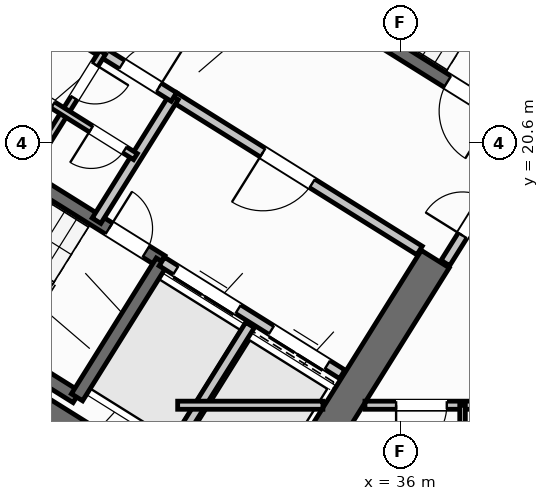
"""IFC4 building model, lengths in metres.
Left out: names, types, materials, properties, quantities, classifications, styles, units other than length and angle.
Written with IfcOpenShell. Run it as: python <this file> out.ifc"""

import sys

from ifc_helpers import new_model, si_unit, direction, frame, frame_2d, origin, place, context, subcontext, project, spatial, rectangle, extrude, source, transform, mapped, element, fill, save


model = new_model("IFC4")
c1 = context("Model", 3, precision=1e-05, world=origin(), true_north=direction((0.0, 1.0)))
c2 = subcontext(c1, "Body", "Model", "MODEL_VIEW")
j1 = project(units=[si_unit("LENGTHUNIT", "METRE"), si_unit("PLANEANGLEUNIT", "RADIAN")], contexts=[c1])
p1 = place(None, origin())
s1 = spatial("IfcSite", under=j1, at=p1, CompositionType="ELEMENT")
p2 = place(p1, origin())
s2 = spatial("IfcBuilding", under=s1, at=p2, CompositionType="ELEMENT")
p3 = place(p2, frame((0.0, 0.0, 49.2)))
s3 = spatial("IfcBuildingStorey", under=s2, at=p3, CompositionType="ELEMENT", Elevation=49.2)
p4 = place(p3, frame((33.409, 12.45, 0.0), z_axis=(0.0, 0.0, 1.0), x_axis=(-0.848051132073, 0.529914405721, 0.0)))
e1 = element("IfcWall", 1, at=p4, inside=s3, PredefinedType="SHEAR", context=c2, shape_type="SweptSolid", body=[
    extrude(rectangle(XDim=13.24, YDim=0.65, at=frame_2d((6.62, 0.0))), origin(), (0.0, 0.0, 1.0), 3.35),
])
p5 = place(p3, frame((36.683, 18.304, 0.0), z_axis=(0.0, 0.0, 1.0), x_axis=(-0.529899109053, -0.848060690178, 0.0)))
e2 = element("IfcWall", 2, at=p5, inside=s3, PredefinedType="SHEAR", context=c2, shape_type="SweptSolid", body=[
    extrude(rectangle(XDim=6.375, YDim=0.65, at=frame_2d((3.188, 0.0))), origin(), (0.0, 0.0, 1.0), 3.35),
])
p6 = place(p3, frame((29.268, 6.429, 0.0), z_axis=(0.0, 0.0, 1.0), x_axis=(-0.848049971435, 0.529916263149, 0.0)))
e3 = element("IfcWall", 3, at=p6, inside=s3, PredefinedType="STANDARD", context=c2, shape_type="SweptSolid", body=[
    extrude(rectangle(XDim=31.588, YDim=0.32, at=frame_2d((15.794, 0.0))), origin(), (0.0, 0.0, 1.0), 3.35),
])
p7 = place(p6, frame((16.362, 0.0, 0.0)))
e4 = element("IfcOpeningElement", 4, at=p7, cuts=e3, PredefinedType="OPENING", context=c2, shape_type="SweptSolid", body=[
    extrude(rectangle(XDim=1.2, YDim=2.15, at=frame_2d((0.6, 1.075))), frame((0.0, 0.17, 0.0), z_axis=(0.0, -1.0, 0.0), x_axis=(1.0, 0.0, 0.0)), (0.0, 0.0, 1.0), 0.34),
])
p8 = place(p6, frame((2.989, 0.0, 0.8)))
e5 = element("IfcOpeningElement", 5, at=p8, cuts=e3, PredefinedType="OPENING", context=c2, shape_type="SweptSolid", body=[
    extrude(rectangle(XDim=2.1, YDim=1.55, at=frame_2d((1.05, 0.775))), frame((0.0, 0.17, 0.0), z_axis=(0.0, -1.0, 0.0), x_axis=(1.0, 0.0, 0.0)), (0.0, 0.0, 1.0), 0.34),
])
p9 = place(p6, frame((8.359, 0.0, 0.8)))
e6 = element("IfcOpeningElement", 6, at=p9, cuts=e3, PredefinedType="OPENING", context=c2, shape_type="SweptSolid", body=[
    extrude(rectangle(XDim=2.1, YDim=1.55, at=frame_2d((1.05, 0.775))), frame((0.0, 0.17, 0.0), z_axis=(0.0, -1.0, 0.0), x_axis=(1.0, 0.0, 0.0)), (0.0, 0.0, 1.0), 0.34),
])
p10 = place(p6, frame((13.284, 0.0, 0.95)))
e7 = element("IfcOpeningElement", 7, at=p10, cuts=e3, PredefinedType="OPENING", context=c2, shape_type="SweptSolid", body=[
    extrude(rectangle(XDim=1.2, YDim=1.4, at=frame_2d((0.6, 0.7))), frame((0.0, 0.17, 0.0), z_axis=(0.0, -1.0, 0.0), x_axis=(1.0, 0.0, 0.0)), (0.0, 0.0, 1.0), 0.34),
])
p11 = place(p6, frame((20.259, 0.0, 0.95)))
e8 = element("IfcOpeningElement", 8, at=p11, cuts=e3, PredefinedType="OPENING", context=c2, shape_type="SweptSolid", body=[
    extrude(rectangle(XDim=1.2, YDim=1.4, at=frame_2d((0.6, 0.7))), frame((0.0, 0.17, 0.0), z_axis=(0.0, -1.0, 0.0), x_axis=(1.0, 0.0, 0.0)), (0.0, 0.0, 1.0), 0.34),
])
p12 = place(p6, frame((22.929, 0.0, 0.95)))
e9 = element("IfcOpeningElement", 9, at=p12, cuts=e3, PredefinedType="OPENING", context=c2, shape_type="SweptSolid", body=[
    extrude(rectangle(XDim=1.2, YDim=1.4, at=frame_2d((0.6, 0.7))), frame((0.0, 0.17, 0.0), z_axis=(0.0, -1.0, 0.0), x_axis=(1.0, 0.0, 0.0)), (0.0, 0.0, 1.0), 0.34),
])
p13 = place(p6, frame((26.106, 0.0, 0.85)))
e10 = element("IfcOpeningElement", 10, at=p13, cuts=e3, PredefinedType="OPENING", context=c2, shape_type="SweptSolid", body=[
    extrude(rectangle(XDim=1.5, YDim=1.5, at=frame_2d((0.75, 0.75))), frame((0.0, 0.17, 0.0), z_axis=(0.0, -1.0, 0.0), x_axis=(1.0, 0.0, 0.0)), (0.0, 0.0, 1.0), 0.34),
])
p14 = place(p6, frame((29.068, 0.0, 0.85)))
e11 = element("IfcOpeningElement", 11, at=p14, cuts=e3, PredefinedType="OPENING", context=c2, shape_type="SweptSolid", body=[
    extrude(rectangle(XDim=1.8, YDim=1.5, at=frame_2d((0.9, 0.75))), frame((0.0, 0.17, 0.0), z_axis=(0.0, -1.0, 0.0), x_axis=(1.0, 0.0, 0.0)), (0.0, 0.0, 1.0), 0.34),
])
p15 = place(p3, frame((29.605, 15.581, 0.0), z_axis=(0.0, 0.0, 1.0), x_axis=(-0.848036911448, 0.529937163087, 0.0)))
e12 = element("IfcWall", 12, at=p15, inside=s3, PredefinedType="SHEAR", context=c2, shape_type="SweptSolid", body=[
    extrude(rectangle(XDim=7.46, YDim=0.26, at=frame_2d((3.73, 0.0))), origin(), (0.0, 0.0, 1.0), 3.35),
])
p16 = place(p3, frame((31.28, 18.261, 0.0), z_axis=(0.0, 0.0, 1.0), x_axis=(-0.848051618787, 0.529913626805, 0.0)))
e13 = element("IfcWall", 13, at=p16, inside=s3, PredefinedType="SHEAR", context=c2, shape_type="SweptSolid", body=[
    extrude(rectangle(XDim=7.46, YDim=0.26, at=frame_2d((3.73, 0.0))), origin(), (0.0, 0.0, 1.0), 3.35),
])
p17 = place(p16, frame((0.36, 0.0, 0.0)))
e14 = element("IfcOpeningElement", 14, at=p17, cuts=e13, PredefinedType="OPENING", context=c2, shape_type="SweptSolid", body=[
    extrude(rectangle(XDim=0.86, YDim=2.05, at=frame_2d((0.43, 1.025))), frame((0.0, 0.14, 0.0), z_axis=(0.0, -1.0, 0.0), x_axis=(1.0, 0.0, 0.0)), (0.0, 0.0, 1.0), 0.28),
])
p18 = place(p3, frame((31.288, 18.256, 0.0), z_axis=(0.0, 0.0, 1.0), x_axis=(-0.529943379326, -0.848033026897, 0.0)))
e15 = element("IfcWall", 15, at=p18, inside=s3, PredefinedType="SHEAR", context=c2, shape_type="SweptSolid", body=[
    extrude(rectangle(XDim=3.16, YDim=0.26, at=frame_2d((1.58, 0.0))), origin(), (0.0, 0.0, 1.0), 3.35),
])
p19 = place(p3, frame((38.046, 21.108, 0.0), z_axis=(0.0, 0.0, 1.0), x_axis=(-0.848054434086, 0.529909121291, 0.0)))
e16 = element("IfcWall", 16, at=p19, inside=s3, PredefinedType="SHEAR", context=c2, shape_type="SweptSolid", body=[
    extrude(rectangle(XDim=7.33, YDim=0.26, at=frame_2d((3.665, 0.0))), origin(), (0.0, 0.0, 1.0), 3.35),
])
p20 = place(p19, frame((0.22, 0.0, 0.0)))
e17 = element("IfcOpeningElement", 17, at=p20, cuts=e16, PredefinedType="OPENING", context=c2, shape_type="SweptSolid", body=[
    extrude(rectangle(XDim=1.1, YDim=2.1, at=frame_2d((0.55, 1.05))), frame((0.0, 0.14, 0.0), z_axis=(0.0, -1.0, 0.0), x_axis=(1.0, 0.0, 0.0)), (0.0, 0.0, 1.0), 0.28),
])
p21 = place(p3, frame((34.848, 16.031, 0.0), z_axis=(0.0, 0.0, 1.0), x_axis=(-0.848044042236, 0.529925751807, 0.0)))
e18 = element("IfcWall", 18, at=p21, inside=s3, PredefinedType="STANDARD", context=c2, shape_type="SweptSolid", body=[
    extrude(rectangle(XDim=4.198, YDim=0.2, at=frame_2d((2.099, 0.0))), origin(), (0.0, 0.0, 1.0), 3.34),
])
p22 = place(p21, frame((0.348, 0.0, 0.0)))
e19 = element("IfcOpeningElement", 19, at=p22, cuts=e18, PredefinedType="OPENING", context=c2, shape_type="SweptSolid", body=[
    extrude(rectangle(XDim=1.3, YDim=2.2, at=frame_2d((0.65, 1.1))), frame((0.0, 0.11, 0.0), z_axis=(0.0, -1.0, 0.0), x_axis=(1.0, 0.0, 0.0)), (0.0, 0.0, 1.0), 0.22),
])
p23 = place(p21, frame((2.423, 0.0, 0.0)))
e20 = element("IfcOpeningElement", 20, at=p23, cuts=e18, PredefinedType="OPENING", context=c2, shape_type="SweptSolid", body=[
    extrude(rectangle(XDim=1.45, YDim=2.25, at=frame_2d((0.725, 1.125))), frame((0.0, 0.11, 0.0), z_axis=(0.0, -1.0, 0.0), x_axis=(1.0, 0.0, 0.0)), (0.0, 0.0, 1.0), 0.22),
])
p24 = place(p3, frame((36.374, 18.474, 0.0), z_axis=(0.0, 0.0, 1.0), x_axis=(-0.848051071577, 0.529914502535, 0.0)))
e21 = element("IfcWall", 21, at=p24, inside=s3, PredefinedType="STANDARD", context=c2, shape_type="SweptSolid", body=[
    extrude(rectangle(XDim=5.718, YDim=0.2, at=frame_2d((2.859, 0.0))), origin(), (0.0, 0.0, 1.0), 3.34),
])
p25 = place(p24, frame((2.498, 0.0, 0.0)))
e22 = element("IfcOpeningElement", 22, at=p25, cuts=e21, PredefinedType="OPENING", context=c2, shape_type="SweptSolid", body=[
    extrude(rectangle(XDim=1.15, YDim=2.1, at=frame_2d((0.575, 1.05))), frame((0.0, 0.11, 0.0), z_axis=(0.0, -1.0, 0.0), x_axis=(1.0, 0.0, 0.0)), (0.0, 0.0, 1.0), 0.22),
])
p26 = place(p3, frame((33.029, 17.003, 0.0), z_axis=(0.0, 0.0, 1.0), x_axis=(-0.529916267533, -0.848049968695, 0.0)))
e23 = element("IfcWall", 23, at=p26, inside=s3, PredefinedType="STANDARD", context=c2, shape_type="SweptSolid", body=[
    extrude(rectangle(XDim=2.92, YDim=0.2, at=frame_2d((1.46, 0.0))), origin(), (0.0, 0.0, 1.0), 3.34),
])
p27 = place(p3, frame((31.525, 21.504, 0.0), z_axis=(0.0, 0.0, 1.0), x_axis=(-0.529907497854, -0.848055448493, 0.0)))
e24 = element("IfcWall", 24, at=p27, inside=s3, PredefinedType="STANDARD", context=c2, shape_type="SweptSolid", body=[
    extrude(rectangle(XDim=2.88, YDim=0.2, at=frame_2d((1.44, 0.0))), origin(), (0.0, 0.0, 1.0), 3.34),
])
p28 = place(p3, frame((31.525, 21.504, 0.0), z_axis=(0.0, 0.0, 1.0), x_axis=(-0.848044998614, 0.529924221305, 0.0)))
e25 = element("IfcWall", 25, at=p28, inside=s3, PredefinedType="STANDARD", context=c2, shape_type="SweptSolid", body=[
    extrude(rectangle(XDim=6.168, YDim=0.2, at=frame_2d((3.084, 0.0))), origin(), (0.0, 0.0, 1.0), 3.34),
])
p29 = place(p28, frame((4.4, 0.0, 0.0)))
e26 = element("IfcOpeningElement", 26, at=p29, cuts=e25, PredefinedType="OPENING", context=c2, shape_type="SweptSolid", body=[
    extrude(rectangle(XDim=0.86, YDim=2.05, at=frame_2d((0.43, 1.025))), frame((0.0, 0.11, 0.0), z_axis=(0.0, -1.0, 0.0), x_axis=(1.0, 0.0, 0.0)), (0.0, 0.0, 1.0), 0.22),
])
p30 = place(p28, frame((0.35, 0.0, 0.0)))
e27 = element("IfcOpeningElement", 27, at=p30, cuts=e25, PredefinedType="OPENING", context=c2, shape_type="SweptSolid", body=[
    extrude(rectangle(XDim=0.86, YDim=2.05, at=frame_2d((0.43, 1.025))), frame((0.0, 0.11, 0.0), z_axis=(0.0, -1.0, 0.0), x_axis=(1.0, 0.0, 0.0)), (0.0, 0.0, 1.0), 0.22),
])
p31 = place(p3, frame((30.117, 22.384, 0.0), z_axis=(0.0, 0.0, 1.0), x_axis=(-0.529951914384, -0.848027693204, 0.0)))
e28 = element("IfcWall", 28, at=p31, inside=s3, PredefinedType="PLUMBINGWALL", context=c2, shape_type="SweptSolid", body=[
    extrude(rectangle(XDim=1.4, YDim=0.14, at=frame_2d((0.7, 0.0))), origin(), (0.0, 0.0, 1.0), 3.34),
])
p32 = place(p31, frame((0.28, 0.0, 0.0)))
e29 = element("IfcOpeningElement", 29, at=p32, cuts=e28, PredefinedType="OPENING", context=c2, shape_type="SweptSolid", body=[
    extrude(rectangle(XDim=0.78, YDim=2.05, at=frame_2d((0.39, 1.025))), frame((0.0, 0.08, 0.0), z_axis=(0.0, -1.0, 0.0), x_axis=(1.0, 0.0, 0.0)), (0.0, 0.0, 1.0), 0.16),
])
p33 = place(p3, frame((29.375, 21.196, 0.0), z_axis=(0.0, 0.0, 1.0), x_axis=(-0.529865479138, -0.848081702443, 0.0)))
e30 = element("IfcWall", 30, at=p33, inside=s3, PredefinedType="PLUMBINGWALL", context=c2, shape_type="SweptSolid", body=[
    extrude(rectangle(XDim=1.48, YDim=0.14, at=frame_2d((0.74, 0.0))), origin(), (0.0, 0.0, 1.0), 3.34),
])
p34 = place(p3, frame((30.766, 20.327, 0.0), z_axis=(0.0, 0.0, 1.0), x_axis=(-0.848052663127, 0.529911955482, 0.0)))
e31 = element("IfcWall", 31, at=p34, inside=s3, PredefinedType="PLUMBINGWALL", context=c2, shape_type="SweptSolid", body=[
    extrude(rectangle(XDim=3.28, YDim=0.14, at=frame_2d((1.64, 0.0))), origin(), (0.0, 0.0, 1.0), 3.34),
])
p35 = place(p34, frame((0.25, 0.0, 0.0)))
e32 = element("IfcOpeningElement", 32, at=p35, cuts=e31, PredefinedType="OPENING", context=c2, shape_type="SweptSolid", body=[
    extrude(rectangle(XDim=0.78, YDim=2.05, at=frame_2d((0.39, 1.025))), frame((0.0, 0.08, 0.0), z_axis=(0.0, -1.0, 0.0), x_axis=(1.0, 0.0, 0.0)), (0.0, 0.0, 1.0), 0.16),
])
p36 = place(p34, frame((1.92, 0.0, 0.0)))
e33 = element("IfcOpeningElement", 33, at=p36, cuts=e31, PredefinedType="OPENING", context=c2, shape_type="SweptSolid", body=[
    extrude(rectangle(XDim=0.78, YDim=2.05, at=frame_2d((0.39, 1.025))), frame((0.0, 0.08, 0.0), z_axis=(0.0, -1.0, 0.0), x_axis=(1.0, 0.0, 0.0)), (0.0, 0.0, 1.0), 0.16),
])
p37 = place(p3, frame((32.164, 10.374, 0.0), z_axis=(0.0, 0.0, 1.0), x_axis=(-0.848044107957, 0.529925646633, 0.0)))
e34 = element("IfcWall", 34, at=p37, inside=s3, PredefinedType="PARTITIONING", context=c2, shape_type="SweptSolid", body=[
    extrude(rectangle(XDim=15.57, YDim=0.16, at=frame_2d((7.785, 0.0))), origin(), (0.0, 0.0, 1.0), 3.34),
])
p38 = place(p37, frame((10.83, 0.0, 0.0)))
e35 = element("IfcOpeningElement", 35, at=p38, cuts=e34, PredefinedType="OPENING", context=c2, shape_type="SweptSolid", body=[
    extrude(rectangle(XDim=1.0, YDim=2.1, at=frame_2d((0.5, 1.05))), frame((0.0, 0.09, 0.0), z_axis=(0.0, -1.0, 0.0), x_axis=(1.0, 0.0, 0.0)), (0.0, 0.0, 1.0), 0.18),
])
p39 = place(p3, frame((29.72, 8.859, 0.0), z_axis=(0.0, 0.0, 1.0), x_axis=(-0.848049134363, 0.529917602752, 0.0)))
e36 = element("IfcWall", 36, at=p39, inside=s3, PredefinedType="PLUMBINGWALL", context=c2, shape_type="SweptSolid", body=[
    extrude(rectangle(XDim=14.3, YDim=0.14, at=frame_2d((7.15, 0.0))), origin(), (0.0, 0.0, 1.0), 3.34),
])
p40 = place(p39, frame((9.57, 0.0, 0.0)))
e37 = element("IfcOpeningElement", 37, at=p40, cuts=e36, PredefinedType="OPENING", context=c2, shape_type="SweptSolid", body=[
    extrude(rectangle(XDim=0.92, YDim=2.08, at=frame_2d((0.46, 1.04))), frame((0.0, 0.08, 0.0), z_axis=(0.0, -1.0, 0.0), x_axis=(1.0, 0.0, 0.0)), (0.0, 0.0, 1.0), 0.16),
])
p41 = place(p3, frame((38.451, 20.737, 0.0), z_axis=(0.0, 0.0, 1.0), x_axis=(-0.529924799939, -0.848044637038, 0.0)))
e38 = element("IfcWall", 38, at=p41, inside=s3, PredefinedType="STANDARD", context=c2, shape_type="SweptSolid", body=[
    extrude(rectangle(XDim=2.96, YDim=0.2, at=frame_2d((1.48, 0.0))), origin(), (0.0, 0.0, 1.0), 3.34),
])
p42 = place(p41, frame((1.46, 0.0, 0.0)))
e39 = element("IfcOpeningElement", 39, at=p42, cuts=e38, PredefinedType="OPENING", context=c2, shape_type="SweptSolid", body=[
    extrude(rectangle(XDim=0.86, YDim=2.05, at=frame_2d((0.43, 1.025))), frame((0.0, 0.11, 0.0), z_axis=(0.0, -1.0, 0.0), x_axis=(1.0, 0.0, 0.0)), (0.0, 0.0, 1.0), 0.22),
])
p43 = place(p3, frame((31.6, 15.42, 0.0), z_axis=(0.0, 0.0, 1.0), x_axis=(1.0, 0.0, 0.0)))
e40 = element("IfcWall", 40, at=p43, inside=s3, PredefinedType="PARTITIONING", context=c2, shape_type="SweptSolid", body=[
    extrude(rectangle(XDim=2.866, YDim=0.16, at=frame_2d((1.433, 0.0))), origin(), (0.0, 0.0, 1.0), 3.34),
])
p44 = place(p3, frame((35.296, 15.42, 0.0), z_axis=(0.0, 0.0, 1.0), x_axis=(1.0, 0.0, 0.0)))
e41 = element("IfcWall", 41, at=p44, inside=s3, PredefinedType="PARTITIONING", context=c2, shape_type="SweptSolid", body=[
    extrude(rectangle(XDim=15.311, YDim=0.16, at=frame_2d((7.655, 0.0))), origin(), (0.0, 0.0, 1.0), 3.34),
])
p45 = place(p44, frame((0.615, 0.0, 0.0)))
e42 = element("IfcOpeningElement", 42, at=p45, cuts=e41, PredefinedType="OPENING", context=c2, shape_type="SweptSolid", body=[
    extrude(rectangle(XDim=1.0, YDim=2.1, at=frame_2d((0.5, 1.05))), frame((0.0, 0.09, 0.0), z_axis=(0.0, -1.0, 0.0), x_axis=(1.0, 0.0, 0.0)), (0.0, 0.0, 1.0), 0.18),
])
p46 = place(p44, frame((9.035, 0.0, 0.0)))
e43 = element("IfcOpeningElement", 43, at=p46, cuts=e41, PredefinedType="OPENING", context=c2, shape_type="SweptSolid", body=[
    extrude(rectangle(XDim=1.0, YDim=2.1, at=frame_2d((0.5, 1.05))), frame((0.0, 0.09, 0.0), z_axis=(0.0, -1.0, 0.0), x_axis=(1.0, 0.0, 0.0)), (0.0, 0.0, 1.0), 0.18),
])
p47 = place(p3, frame((37.222, 1.96, 0.0), z_axis=(0.0, 0.0, 1.0), x_axis=(0.0, 1.0, 0.0)))
e44 = element("IfcWall", 44, at=p47, inside=s3, PredefinedType="PARTITIONING", context=c2, shape_type="SweptSolid", body=[
    extrude(rectangle(XDim=13.46, YDim=0.11, at=frame_2d((6.73, 0.0))), origin(), (0.0, 0.0, 1.0), 3.34),
])
p48 = place(p47, frame((5.2, 0.0, 0.0)))
e45 = element("IfcOpeningElement", 45, at=p48, cuts=e44, PredefinedType="OPENING", context=c2, shape_type="SweptSolid", body=[
    extrude(rectangle(XDim=0.92, YDim=2.08, at=frame_2d((0.46, 1.04))), frame((0.0, 0.065, 0.0), z_axis=(0.0, -1.0, 0.0), x_axis=(1.0, 0.0, 0.0)), (0.0, 0.0, 1.0), 0.13),
])
p49 = place(p47, frame((10.89, 0.0, 0.0)))
e46 = element("IfcOpeningElement", 46, at=p49, cuts=e44, PredefinedType="OPENING", context=c2, shape_type="SweptSolid", body=[
    extrude(rectangle(XDim=0.88, YDim=2.08, at=frame_2d((0.44, 1.04))), frame((0.0, 0.065, 0.0), z_axis=(0.0, -1.0, 0.0), x_axis=(1.0, 0.0, 0.0)), (0.0, 0.0, 1.0), 0.13),
])
m1 = source(origin(), c2, "Body", "SweptSolid", [
    extrude(rectangle(XDim=0.86, YDim=2.05, at=frame_2d((0.43, 1.025))), frame((0.0, 0.025, 0.0), z_axis=(0.0, -1.0, 0.0), x_axis=(1.0, 0.0, 0.0)), (0.0, 0.0, 1.0), 0.05),
])
p50 = place(p17, frame((0.86, 0.0, 0.0), z_axis=(0.0, 0.0, 1.0), x_axis=(-1.0, 0.0, 0.0)))
e47 = element("IfcDoor", 47, at=p50, inside=s3, OperationType="SINGLE_SWING_LEFT", PredefinedType="DOOR", context=c2, shape_type="MappedRepresentation", body=[
    mapped(m1, transform((0.0, 0.0, 0.0), scale=1.0)),
])
fill(e14, e47)
m2 = source(origin(), c2, "Body", "SweptSolid", [
    extrude(rectangle(XDim=1.1, YDim=2.1, at=frame_2d((0.55, 1.05))), frame((0.0, 0.025, 0.0), z_axis=(0.0, -1.0, 0.0), x_axis=(1.0, 0.0, 0.0)), (0.0, 0.0, 1.0), 0.05),
])
p51 = place(p20, origin())
e48 = element("IfcDoor", 48, at=p51, inside=s3, OperationType="SINGLE_SWING_LEFT", PredefinedType="DOOR", context=c2, shape_type="MappedRepresentation", body=[
    mapped(m2, transform((0.0, 0.0, 0.0), scale=1.0)),
])
fill(e17, e48)
m3 = source(origin(), c2, "Body", "SweptSolid", [
    extrude(rectangle(XDim=1.15, YDim=2.1, at=frame_2d((0.575, 1.05))), frame((0.0, 0.025, 0.0), z_axis=(0.0, -1.0, 0.0), x_axis=(1.0, 0.0, 0.0)), (0.0, 0.0, 1.0), 0.05),
])
p52 = place(p25, origin())
e49 = element("IfcDoor", 49, at=p52, inside=s3, OperationType="SINGLE_SWING_RIGHT", PredefinedType="DOOR", context=c2, shape_type="MappedRepresentation", body=[
    mapped(m3, transform((0.0, 0.0, 0.0), scale=1.0)),
])
fill(e22, e49)
m4 = source(origin(), c2, "Body", "SweptSolid", [
    extrude(rectangle(XDim=1.3, YDim=2.2, at=frame_2d((0.65, 1.1))), frame((0.0, 0.025, 0.0), z_axis=(0.0, -1.0, 0.0), x_axis=(1.0, 0.0, 0.0)), (0.0, 0.0, 1.0), 0.05),
])
p53 = place(p22, origin())
e50 = element("IfcDoor", 50, at=p53, inside=s3, OperationType="DOUBLE_DOOR_SLIDING", PredefinedType="DOOR", context=c2, shape_type="MappedRepresentation", body=[
    mapped(m4, transform((0.0, 0.0, 0.0), scale=1.0)),
])
fill(e19, e50)
m5 = source(origin(), c2, "Body", "SweptSolid", [
    extrude(rectangle(XDim=1.45, YDim=2.25, at=frame_2d((0.725, 1.125))), frame((0.0, 0.025, 0.0), z_axis=(0.0, -1.0, 0.0), x_axis=(1.0, 0.0, 0.0)), (0.0, 0.0, 1.0), 0.05),
])
p54 = place(p23, origin())
e51 = element("IfcDoor", 51, at=p54, inside=s3, OperationType="DOUBLE_DOOR_SLIDING", PredefinedType="DOOR", context=c2, shape_type="MappedRepresentation", body=[
    mapped(m5, transform((0.0, 0.0, 0.0), scale=1.0)),
])
fill(e20, e51)
p55 = place(p30, frame((0.86, 0.0, 0.0), z_axis=(0.0, 0.0, 1.0), x_axis=(-1.0, 0.0, 0.0)))
e52 = element("IfcDoor", 52, at=p55, inside=s3, OperationType="SINGLE_SWING_RIGHT", PredefinedType="DOOR", context=c2, shape_type="MappedRepresentation", body=[
    mapped(m1, transform((0.0, 0.0, 0.0), scale=1.0)),
])
fill(e27, e52)
m6 = source(origin(), c2, "Body", "SweptSolid", [
    extrude(rectangle(XDim=0.78, YDim=2.05, at=frame_2d((0.39, 1.025))), frame((0.0, 0.025, 0.0), z_axis=(0.0, -1.0, 0.0), x_axis=(1.0, 0.0, 0.0)), (0.0, 0.0, 1.0), 0.05),
])
p56 = place(p32, origin())
e53 = element("IfcDoor", 53, at=p56, inside=s3, OperationType="SINGLE_SWING_LEFT", PredefinedType="DOOR", context=c2, shape_type="MappedRepresentation", body=[
    mapped(m6, transform((0.0, 0.0, 0.0), scale=1.0)),
])
fill(e29, e53)
p57 = place(p35, origin())
e54 = element("IfcDoor", 54, at=p57, inside=s3, OperationType="SINGLE_SWING_RIGHT", PredefinedType="DOOR", context=c2, shape_type="MappedRepresentation", body=[
    mapped(m6, transform((0.0, 0.0, 0.0), scale=1.0)),
])
fill(e32, e54)
p58 = place(p36, origin())
e55 = element("IfcDoor", 55, at=p58, inside=s3, OperationType="SINGLE_SWING_LEFT", PredefinedType="DOOR", context=c2, shape_type="MappedRepresentation", body=[
    mapped(m6, transform((0.0, 0.0, 0.0), scale=1.0)),
])
fill(e33, e55)
p59 = place(p42, frame((0.86, 0.0, 0.0), z_axis=(0.0, 0.0, 1.0), x_axis=(-1.0, 0.0, 0.0)))
e56 = element("IfcDoor", 56, at=p59, inside=s3, OperationType="SINGLE_SWING_LEFT", PredefinedType="DOOR", context=c2, shape_type="MappedRepresentation", body=[
    mapped(m1, transform((0.0, 0.0, 0.0), scale=1.0)),
])
fill(e39, e56)
m7 = source(origin(), c2, "Body", "SweptSolid", [
    extrude(rectangle(XDim=1.0, YDim=2.1, at=frame_2d((0.5, 1.05))), frame((0.0, 0.025, 0.0), z_axis=(0.0, -1.0, 0.0), x_axis=(1.0, 0.0, 0.0)), (0.0, 0.0, 1.0), 0.05),
])
p60 = place(p45, frame((1.0, 0.0, 0.0), z_axis=(0.0, 0.0, 1.0), x_axis=(-1.0, 0.0, 0.0)))
e57 = element("IfcDoor", 57, at=p60, inside=s3, OperationType="SINGLE_SWING_RIGHT", PredefinedType="DOOR", context=c2, shape_type="MappedRepresentation", body=[
    mapped(m7, transform((0.0, 0.0, 0.0), scale=1.0)),
])
fill(e42, e57)
save(model, sys.argv[1])
